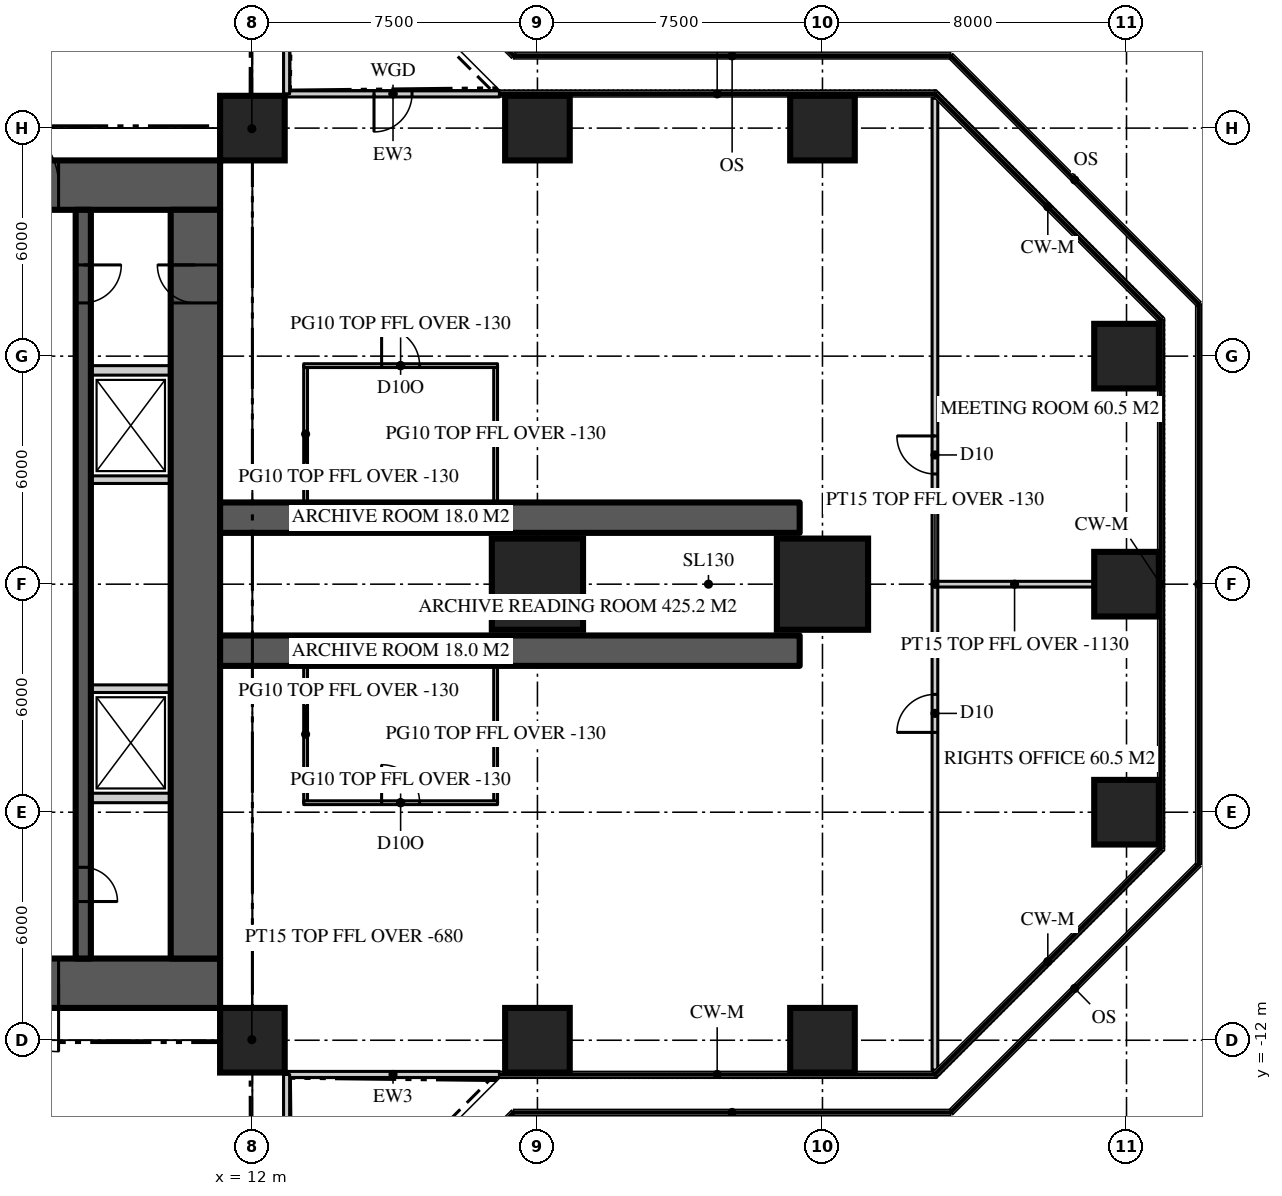
"""IFC4 building model, lengths in metres.
Left out: names, types, materials, properties, quantities, classifications, styles, units other than length and angle.
Written with IfcOpenShell. Run it as: python <this file> out.ifc"""

import sys

from ifc_helpers import new_model, si_unit, direction, frame, frame_2d, origin, origin_2d, place, context, subcontext, project, spatial, rectangle, extrude, element, fill, save


model = new_model("IFC4")
c1 = context("Model", 3, precision=1e-05, world=origin(), true_north=direction((0.0, 1.0)))
c2 = subcontext(c1, "Body", "Model", "MODEL_VIEW")
j1 = project(units=[si_unit("LENGTHUNIT", "METRE"), si_unit("PLANEANGLEUNIT", "RADIAN")], contexts=[c1])
p1 = place(None, origin())
s1 = spatial("IfcSite", under=j1, at=p1, CompositionType="ELEMENT")
p2 = place(p1, origin())
s2 = spatial("IfcBuilding", under=s1, at=p2, CompositionType="ELEMENT")
p3 = place(p2, frame((0.0, 0.0, 163.2)))
s3 = spatial("IfcBuildingStorey", under=s2, at=p3, CompositionType="ELEMENT", Elevation=163.2)
p4 = place(p3, frame((-11.15, 10.5, 0.0), z_axis=(0.0, 0.0, 1.0), x_axis=(1.0, 0.0, 0.0)))
e1 = element("IfcWall", 1, at=p4, inside=s3, PredefinedType="SHEAR", context=c2, shape_type="SweptSolid", body=[
    extrude(rectangle(XDim=22.3, YDim=1.3, at=frame_2d((11.15, 0.0))), origin(), (0.0, 0.0, 1.0), 3.9),
])
p5 = place(p4, frame((4.25, 0.0, 0.0)))
e2 = element("IfcOpeningElement", 2, at=p5, cuts=e1, PredefinedType="OPENING", context=c2, shape_type="SweptSolid", body=[
    extrude(rectangle(XDim=1.8, YDim=2.2, at=frame_2d((0.9, 1.1))), frame((0.0, 0.66, 0.0), z_axis=(0.0, -1.0, 0.0), x_axis=(1.0, 0.0, 0.0)), (0.0, 0.0, 1.0), 1.32),
])
p6 = place(p4, frame((16.25, 0.0, 0.0)))
e3 = element("IfcOpeningElement", 3, at=p6, cuts=e1, PredefinedType="OPENING", context=c2, shape_type="SweptSolid", body=[
    extrude(rectangle(XDim=1.8, YDim=2.2, at=frame_2d((0.9, 1.1))), frame((0.0, 0.66, 0.0), z_axis=(0.0, -1.0, 0.0), x_axis=(1.0, 0.0, 0.0)), (0.0, 0.0, 1.0), 1.32),
])
p7 = place(p3, frame((11.15, -10.5, 0.0), z_axis=(0.0, 0.0, 1.0), x_axis=(-1.0, 0.0, 0.0)))
e4 = element("IfcWall", 4, at=p7, inside=s3, PredefinedType="SHEAR", context=c2, shape_type="SweptSolid", body=[
    extrude(rectangle(XDim=22.3, YDim=1.3, at=frame_2d((11.15, 0.0))), origin(), (0.0, 0.0, 1.0), 3.9),
])
p8 = place(p7, frame((16.25, 0.0, 0.0)))
e5 = element("IfcOpeningElement", 5, at=p8, cuts=e4, PredefinedType="OPENING", context=c2, shape_type="SweptSolid", body=[
    extrude(rectangle(XDim=1.8, YDim=2.2, at=frame_2d((0.9, 1.1))), frame((0.0, 0.66, 0.0), z_axis=(0.0, -1.0, 0.0), x_axis=(1.0, 0.0, 0.0)), (0.0, 0.0, 1.0), 1.32),
])
p9 = place(p7, frame((4.25, 0.0, 0.0)))
e6 = element("IfcOpeningElement", 6, at=p9, cuts=e4, PredefinedType="OPENING", context=c2, shape_type="SweptSolid", body=[
    extrude(rectangle(XDim=1.8, YDim=2.2, at=frame_2d((0.9, 1.1))), frame((0.0, 0.66, 0.0), z_axis=(0.0, -1.0, 0.0), x_axis=(1.0, 0.0, 0.0)), (0.0, 0.0, 1.0), 1.32),
])
p10 = place(p3, frame((10.5, -9.85, 0.0), z_axis=(0.0, 0.0, 1.0), x_axis=(0.0, 1.0, 0.0)))
e7 = element("IfcWall", 7, at=p10, inside=s3, PredefinedType="SHEAR", context=c2, shape_type="SweptSolid", body=[
    extrude(rectangle(XDim=19.7, YDim=1.3, at=frame_2d((9.85, 0.0))), origin(), (0.0, 0.0, 1.0), 3.9),
])
p11 = place(p10, frame((17.25, 0.0, 0.0)))
e8 = element("IfcOpeningElement", 8, at=p11, cuts=e7, PredefinedType="OPENING", context=c2, shape_type="SweptSolid", body=[
    extrude(rectangle(XDim=1.0, YDim=2.2, at=frame_2d((0.5, 1.1))), frame((0.0, 0.66, 0.0), z_axis=(0.0, -1.0, 0.0), x_axis=(1.0, 0.0, 0.0)), (0.0, 0.0, 1.0), 1.32),
])
for number, where, z_axis, x_axis in (
    (9, (11.15, -1.75, 0.0), (0.0, 0.0, 1.0), (1.0, 0.0, 0.0)),
    (10, (11.15, 1.75, 0.0), (0.0, 0.0, 1.0), (1.0, 0.0, 0.0)),
):
    element("IfcWall", number, at=place(p3, frame(where, z_axis=z_axis, x_axis=x_axis)), inside=s3, PredefinedType="SHEAR", context=c2, shape_type="SweptSolid", body=[
        extrude(rectangle(XDim=15.25, YDim=0.8, at=frame_2d((7.625, 0.0))), origin(), (0.0, 0.0, 1.0), 3.9),
    ])
for number, where, z_axis, x_axis in (
    (11, (12.0, -12.0, 0.0), (0.0, 0.0, 1.0), (1.0, 0.0, 0.0)),
    (12, (19.5, -12.0, 0.0), (0.0, 0.0, 1.0), (1.0, 0.0, 0.0)),
    (13, (27.0, -12.0, 0.0), (0.0, 0.0, 1.0), (1.0, 0.0, 0.0)),
    (14, (35.0, -6.0, 0.0), (0.0, 0.0, 1.0), (1.0, 0.0, 0.0)),
):
    element("IfcColumn", number, at=place(p3, frame(where, z_axis=z_axis, x_axis=x_axis)), inside=s3, PredefinedType="COLUMN", context=c2, shape_type="SweptSolid", body=[
        extrude(rectangle(XDim=1.7, YDim=1.7, at=origin_2d()), origin(), (0.0, 0.0, 1.0), 3.9),
    ])
for number, where, z_axis, x_axis in (
    (15, (19.5, 0.0, 0.0), (0.0, 0.0, 1.0), (1.0, 0.0, 0.0)),
    (16, (27.0, 0.0, 0.0), (0.0, 0.0, 1.0), (1.0, 0.0, 0.0)),
):
    element("IfcColumn", number, at=place(p3, frame(where, z_axis=z_axis, x_axis=x_axis)), inside=s3, PredefinedType="COLUMN", context=c2, shape_type="SweptSolid", body=[
        extrude(rectangle(XDim=2.4, YDim=2.4, at=origin_2d()), origin(), (0.0, 0.0, 1.0), 3.9),
    ])
for number, where, z_axis, x_axis in (
    (17, (35.0, 0.0, 0.0), (0.0, 0.0, 1.0), (1.0, 0.0, 0.0)),
    (18, (35.0, 6.0, 0.0), (0.0, 0.0, 1.0), (1.0, 0.0, 0.0)),
    (19, (12.0, 12.0, 0.0), (0.0, 0.0, 1.0), (1.0, 0.0, 0.0)),
    (20, (19.5, 12.0, 0.0), (0.0, 0.0, 1.0), (1.0, 0.0, 0.0)),
    (21, (27.0, 12.0, 0.0), (0.0, 0.0, 1.0), (1.0, 0.0, 0.0)),
):
    element("IfcColumn", number, at=place(p3, frame(where, z_axis=z_axis, x_axis=x_axis)), inside=s3, PredefinedType="COLUMN", context=c2, shape_type="SweptSolid", body=[
        extrude(rectangle(XDim=1.7, YDim=1.7, at=origin_2d()), origin(), (0.0, 0.0, 1.0), 3.9),
    ])
p12 = place(p3, frame((12.9, -12.9, 0.0), z_axis=(0.0, 0.0, 1.0), x_axis=(1.0, 0.0, 0.0)))
e22 = element("IfcWall", 22, at=p12, inside=s3, PredefinedType="SOLIDWALL", context=c2, shape_type="SweptSolid", body=[
    extrude(rectangle(XDim=5.6, YDim=0.16, at=frame_2d((2.8, 0.0))), origin(), (0.0, 0.0, 1.0), 3.77),
])
p13 = place(p3, frame((18.5, 12.9, 0.0), z_axis=(0.0, 0.0, 1.0), x_axis=(-1.0, 0.0, 0.0)))
e23 = element("IfcWall", 23, at=p13, inside=s3, PredefinedType="SOLIDWALL", context=c2, shape_type="SweptSolid", body=[
    extrude(rectangle(XDim=5.6, YDim=0.16, at=frame_2d((2.8, 0.0))), origin(), (0.0, 0.0, 1.0), 3.77),
])
p14 = place(p13, frame((2.3, 0.0, 0.0)))
e24 = element("IfcOpeningElement", 24, at=p14, cuts=e23, PredefinedType="OPENING", context=c2, shape_type="SweptSolid", body=[
    extrude(rectangle(XDim=1.0, YDim=2.2, at=frame_2d((0.5, 1.1))), frame((0.0, 0.09, 0.0), z_axis=(0.0, -1.0, 0.0), x_axis=(1.0, 0.0, 0.0)), (0.0, 0.0, 1.0), 0.18),
])
p15 = place(p3, frame((12.9, 12.9, 0.0), z_axis=(0.0, 0.0, 1.0), x_axis=(0.0, 1.0, 0.0)))
e25 = element("IfcWall", 25, at=p15, inside=s3, PredefinedType="SOLIDWALL", context=c2, shape_type="SweptSolid", body=[
    extrude(rectangle(XDim=5.6, YDim=0.16, at=frame_2d((2.8, 0.0))), origin(), (0.0, 0.0, 1.0), 3.77),
])
p16 = place(p3, frame((12.9, -18.5, 0.0), z_axis=(0.0, 0.0, 1.0), x_axis=(0.0, 1.0, 0.0)))
e26 = element("IfcWall", 26, at=p16, inside=s3, PredefinedType="SOLIDWALL", context=c2, shape_type="SweptSolid", body=[
    extrude(rectangle(XDim=5.6, YDim=0.16, at=frame_2d((2.8, 0.0))), origin(), (0.0, 0.0, 1.0), 3.77),
])
p17 = place(p16, frame((2.3, 0.0, 0.0)))
e27 = element("IfcOpeningElement", 27, at=p17, cuts=e26, PredefinedType="OPENING", context=c2, shape_type="SweptSolid", body=[
    extrude(rectangle(XDim=1.0, YDim=2.2, at=frame_2d((0.5, 1.1))), frame((0.0, 0.09, 0.0), z_axis=(0.0, -1.0, 0.0), x_axis=(1.0, 0.0, 0.0)), (0.0, 0.0, 1.0), 0.18),
])
p18 = place(p3, frame((7.55, 9.85, 0.0), z_axis=(0.0, 0.0, 1.0), x_axis=(0.0, -1.0, 0.0)))
e28 = element("IfcWall", 28, at=p18, inside=s3, PredefinedType="SHEAR", context=c2, shape_type="SweptSolid", body=[
    extrude(rectangle(XDim=19.7, YDim=0.4, at=frame_2d((9.85, 0.0))), origin(), (0.0, 0.0, 1.0), 3.9),
])
p19 = place(p18, frame((1.45, 0.0, 0.0)))
e29 = element("IfcOpeningElement", 29, at=p19, cuts=e28, PredefinedType="OPENING", context=c2, shape_type="SweptSolid", body=[
    extrude(rectangle(XDim=1.0, YDim=2.2, at=frame_2d((0.5, 1.1))), frame((0.0, 0.21, 0.0), z_axis=(0.0, -1.0, 0.0), x_axis=(1.0, 0.0, 0.0)), (0.0, 0.0, 1.0), 0.42),
])
p20 = place(p18, frame((17.3, 0.0, 0.0)))
e30 = element("IfcOpeningElement", 30, at=p20, cuts=e28, PredefinedType="OPENING", context=c2, shape_type="SweptSolid", body=[
    extrude(rectangle(XDim=0.9, YDim=2.1, at=frame_2d((0.45, 1.05))), frame((0.0, 0.21, 0.0), z_axis=(0.0, -1.0, 0.0), x_axis=(1.0, 0.0, 0.0)), (0.0, 0.0, 1.0), 0.42),
])
for number, where, z_axis, x_axis in (
    (31, (7.75, 5.625, 0.0), (0.0, 0.0, 1.0), (1.0, 0.0, 0.0)),
    (32, (7.75, -5.625, 0.0), (0.0, 0.0, 1.0), (1.0, 0.0, 0.0)),
):
    element("IfcWall", number, at=place(p3, frame(where, z_axis=z_axis, x_axis=x_axis)), inside=s3, PredefinedType="SOLIDWALL", context=c2, shape_type="SweptSolid", body=[
        extrude(rectangle(XDim=2.1, YDim=0.25, at=frame_2d((1.05, 0.0))), origin(), (0.0, 0.0, 1.0), 3.7),
    ])
for number, where, z_axis, x_axis in (
    (33, (7.75, -2.75, 0.0), (0.0, 0.0, 1.0), (1.0, 0.0, 0.0)),
    (34, (7.75, 2.75, 0.0), (0.0, 0.0, 1.0), (1.0, 0.0, 0.0)),
):
    element("IfcWall", number, at=place(p3, frame(where, z_axis=z_axis, x_axis=x_axis)), inside=s3, PredefinedType="SOLIDWALL", context=c2, shape_type="SweptSolid", body=[
        extrude(rectangle(XDim=2.1, YDim=0.2, at=frame_2d((1.05, 0.0))), origin(), (0.0, 0.0, 1.0), 3.7),
    ])
p21 = place(p3, frame((29.959, -12.786, 0.0), z_axis=(0.0, 0.0, 1.0), x_axis=(0.0, 1.0, 0.0)))
e35 = element("IfcWall", 35, at=p21, inside=s3, PredefinedType="PARTITIONING", context=c2, shape_type="SweptSolid", body=[
    extrude(rectangle(XDim=25.573, YDim=0.15, at=frame_2d((12.786, 0.0))), origin(), (0.0, 0.0, 1.0), 3.77),
])
p22 = place(p21, frame((15.687, 0.0, 0.0)))
e36 = element("IfcOpeningElement", 36, at=p22, cuts=e35, PredefinedType="OPENING", context=c2, shape_type="SweptSolid", body=[
    extrude(rectangle(XDim=1.0, YDim=2.2, at=frame_2d((0.5, 1.1))), frame((0.0, 0.085, 0.0), z_axis=(0.0, -1.0, 0.0), x_axis=(1.0, 0.0, 0.0)), (0.0, 0.0, 1.0), 0.17),
])
p23 = place(p21, frame((8.886, 0.0, 0.0)))
e37 = element("IfcOpeningElement", 37, at=p23, cuts=e35, PredefinedType="OPENING", context=c2, shape_type="SweptSolid", body=[
    extrude(rectangle(XDim=1.0, YDim=2.2, at=frame_2d((0.5, 1.1))), frame((0.0, 0.085, 0.0), z_axis=(0.0, -1.0, 0.0), x_axis=(1.0, 0.0, 0.0)), (0.0, 0.0, 1.0), 0.17),
])
p24 = place(p3, frame((29.959, 0.0, 0.0), z_axis=(0.0, 0.0, 1.0), x_axis=(1.0, 0.0, 0.0)))
e38 = element("IfcWall", 38, at=p24, inside=s3, PredefinedType="PARTITIONING", context=c2, shape_type="SweptSolid", body=[
    extrude(rectangle(XDim=4.191, YDim=0.15, at=frame_2d((2.095, 0.0))), origin(), (0.0, 0.0, 1.0), 2.77),
])
for number, where, z_axis, x_axis in (
    (39, (13.4, 2.15, 0.0), (0.0, 0.0, 1.0), (0.0, 1.0, 0.0)),
    (40, (18.4, 2.15, 0.0), (0.0, 0.0, 1.0), (0.0, 1.0, 0.0)),
):
    element("IfcWall", number, at=place(p3, frame(where, z_axis=z_axis, x_axis=x_axis)), inside=s3, PredefinedType="PARTITIONING", context=c2, shape_type="SweptSolid", body=[
        extrude(rectangle(XDim=3.6, YDim=0.1, at=frame_2d((1.8, 0.0))), origin(), (0.0, 0.0, 1.0), 3.77),
    ])
p25 = place(p3, frame((13.35, 5.75, 0.0), z_axis=(0.0, 0.0, 1.0), x_axis=(1.0, 0.0, 0.0)))
e41 = element("IfcWall", 41, at=p25, inside=s3, PredefinedType="PARTITIONING", context=c2, shape_type="SweptSolid", body=[
    extrude(rectangle(XDim=5.1, YDim=0.1, at=frame_2d((2.55, 0.0))), origin(), (0.0, 0.0, 1.0), 3.77),
])
p26 = place(p25, frame((2.05, 0.0, 0.0)))
e42 = element("IfcOpeningElement", 42, at=p26, cuts=e41, PredefinedType="OPENING", context=c2, shape_type="SweptSolid", body=[
    extrude(rectangle(XDim=1.0, YDim=2.2, at=frame_2d((0.5, 1.1))), frame((0.0, 0.06, 0.0), z_axis=(0.0, -1.0, 0.0), x_axis=(1.0, 0.0, 0.0)), (0.0, 0.0, 1.0), 0.12),
])
for number, where, z_axis, x_axis in (
    (43, (13.4, -2.15, 0.0), (0.0, 0.0, 1.0), (0.0, -1.0, 0.0)),
    (44, (18.4, -2.15, 0.0), (0.0, 0.0, 1.0), (0.0, -1.0, 0.0)),
):
    element("IfcWall", number, at=place(p3, frame(where, z_axis=z_axis, x_axis=x_axis)), inside=s3, PredefinedType="PARTITIONING", context=c2, shape_type="SweptSolid", body=[
        extrude(rectangle(XDim=3.6, YDim=0.1, at=frame_2d((1.8, 0.0))), origin(), (0.0, 0.0, 1.0), 3.77),
    ])
p27 = place(p3, frame((13.35, -5.75, 0.0), z_axis=(0.0, 0.0, 1.0), x_axis=(1.0, 0.0, 0.0)))
e45 = element("IfcWall", 45, at=p27, inside=s3, PredefinedType="PARTITIONING", context=c2, shape_type="SweptSolid", body=[
    extrude(rectangle(XDim=5.1, YDim=0.1, at=frame_2d((2.55, 0.0))), origin(), (0.0, 0.0, 1.0), 3.77),
])
p28 = place(p27, frame((2.05, 0.0, 0.0)))
e46 = element("IfcOpeningElement", 46, at=p28, cuts=e45, PredefinedType="OPENING", context=c2, shape_type="SweptSolid", body=[
    extrude(rectangle(XDim=1.0, YDim=2.2, at=frame_2d((0.5, 1.1))), frame((0.0, 0.06, 0.0), z_axis=(0.0, -1.0, 0.0), x_axis=(1.0, 0.0, 0.0)), (0.0, 0.0, 1.0), 0.12),
])
for number, where, z_axis, x_axis in (
    (47, (11.15, 11.15, 0.0), (0.0, 0.0, 1.0), (0.707, 0.707, 0.0)),
    (48, (11.15, -11.15, 0.0), (0.0, 0.0, 1.0), (0.707, -0.707, 0.0)),
):
    element("IfcWall", number, at=place(p3, frame(where, z_axis=z_axis, x_axis=x_axis)), inside=s3, PredefinedType="PARTITIONING", context=c2, shape_type="SweptSolid", body=[
        extrude(rectangle(XDim=2.362, YDim=0.15, at=frame_2d((1.181, 0.0))), origin(), (0.0, 0.0, 1.0), 3.22),
    ])
p29 = place(p14, origin())
e49 = element("IfcDoor", 49, at=p29, inside=s3, OperationType="SINGLE_SWING_RIGHT", PredefinedType="DOOR", context=c2, shape_type="SweptSolid", body=[
    extrude(rectangle(XDim=1.0, YDim=2.2, at=frame_2d((0.5, 1.1))), frame((0.0, 0.025, 0.0), z_axis=(0.0, -1.0, 0.0), x_axis=(1.0, 0.0, 0.0)), (0.0, 0.0, 1.0), 0.05),
])
fill(e24, e49)
p30 = place(p6, origin())
e50 = element("IfcDoor", 50, at=p30, inside=s3, OperationType="DOUBLE_DOOR_DOUBLE_SWING", PredefinedType="DOOR", context=c2, shape_type="SweptSolid", body=[
    extrude(rectangle(XDim=1.8, YDim=2.2, at=frame_2d((0.9, 1.1))), frame((0.0, 0.025, 0.0), z_axis=(0.0, -1.0, 0.0), x_axis=(1.0, 0.0, 0.0)), (0.0, 0.0, 1.0), 0.05),
])
fill(e3, e50)
p31 = place(p9, origin())
e51 = element("IfcDoor", 51, at=p31, inside=s3, OperationType="DOUBLE_DOOR_DOUBLE_SWING", PredefinedType="DOOR", context=c2, shape_type="SweptSolid", body=[
    extrude(rectangle(XDim=1.8, YDim=2.2, at=frame_2d((0.9, 1.1))), frame((0.0, 0.025, 0.0), z_axis=(0.0, -1.0, 0.0), x_axis=(1.0, 0.0, 0.0)), (0.0, 0.0, 1.0), 0.05),
])
fill(e6, e51)
p32 = place(p19, origin())
e52 = element("IfcDoor", 52, at=p32, inside=s3, OperationType="SINGLE_SWING_LEFT", PredefinedType="DOOR", context=c2, shape_type="SweptSolid", body=[
    extrude(rectangle(XDim=1.0, YDim=2.2, at=frame_2d((0.5, 1.1))), frame((0.0, 0.025, 0.0), z_axis=(0.0, -1.0, 0.0), x_axis=(1.0, 0.0, 0.0)), (0.0, 0.0, 1.0), 0.05),
])
fill(e29, e52)
p33 = place(p11, origin())
e53 = element("IfcDoor", 53, at=p33, inside=s3, OperationType="SINGLE_SWING_RIGHT", PredefinedType="DOOR", context=c2, shape_type="SweptSolid", body=[
    extrude(rectangle(XDim=1.0, YDim=2.2, at=frame_2d((0.5, 1.1))), frame((0.0, 0.025, 0.0), z_axis=(0.0, -1.0, 0.0), x_axis=(1.0, 0.0, 0.0)), (0.0, 0.0, 1.0), 0.05),
])
fill(e8, e53)
p34 = place(p20, origin())
e54 = element("IfcDoor", 54, at=p34, inside=s3, OperationType="SINGLE_SWING_RIGHT", PredefinedType="DOOR", context=c2, shape_type="SweptSolid", body=[
    extrude(rectangle(XDim=0.9, YDim=2.1, at=frame_2d((0.45, 1.05))), frame((0.0, 0.025, 0.0), z_axis=(0.0, -1.0, 0.0), x_axis=(1.0, 0.0, 0.0)), (0.0, 0.0, 1.0), 0.05),
])
fill(e30, e54)
p35 = place(p22, origin())
e55 = element("IfcDoor", 55, at=p35, inside=s3, OperationType="SINGLE_SWING_RIGHT", PredefinedType="DOOR", context=c2, shape_type="SweptSolid", body=[
    extrude(rectangle(XDim=1.0, YDim=2.2, at=frame_2d((0.5, 1.1))), frame((0.0, 0.025, 0.0), z_axis=(0.0, -1.0, 0.0), x_axis=(1.0, 0.0, 0.0)), (0.0, 0.0, 1.0), 0.05),
])
fill(e36, e55)
p36 = place(p23, origin())
e56 = element("IfcDoor", 56, at=p36, inside=s3, OperationType="SINGLE_SWING_LEFT", PredefinedType="DOOR", context=c2, shape_type="SweptSolid", body=[
    extrude(rectangle(XDim=1.0, YDim=2.2, at=frame_2d((0.5, 1.1))), frame((0.0, 0.025, 0.0), z_axis=(0.0, -1.0, 0.0), x_axis=(1.0, 0.0, 0.0)), (0.0, 0.0, 1.0), 0.05),
])
fill(e37, e56)
p37 = place(p26, origin())
e57 = element("IfcDoor", 57, at=p37, inside=s3, OperationType="SINGLE_SWING_LEFT", PredefinedType="DOOR", context=c2, shape_type="SweptSolid", body=[
    extrude(rectangle(XDim=1.0, YDim=2.2, at=frame_2d((0.5, 1.1))), frame((0.0, 0.025, 0.0), z_axis=(0.0, -1.0, 0.0), x_axis=(1.0, 0.0, 0.0)), (0.0, 0.0, 1.0), 0.05),
])
fill(e42, e57)
p38 = place(p28, origin())
e58 = element("IfcDoor", 58, at=p38, inside=s3, OperationType="SINGLE_SWING_LEFT", PredefinedType="DOOR", context=c2, shape_type="SweptSolid", body=[
    extrude(rectangle(XDim=1.0, YDim=2.2, at=frame_2d((0.5, 1.1))), frame((0.0, 0.025, 0.0), z_axis=(0.0, -1.0, 0.0), x_axis=(1.0, 0.0, 0.0)), (0.0, 0.0, 1.0), 0.05),
])
fill(e46, e58)
save(model, sys.argv[1])
